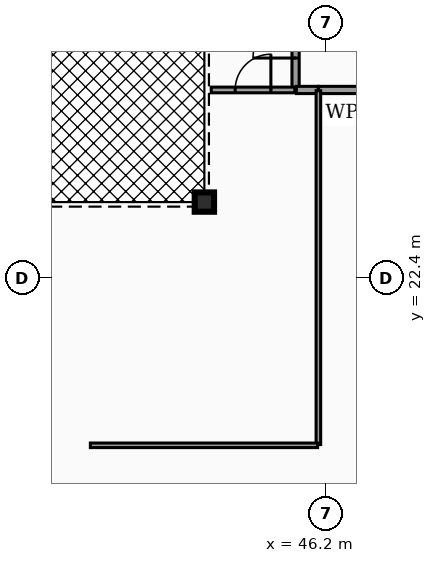
"""IFC4 building model, lengths in metres.
Left out: names, types, materials, properties, quantities, classifications, styles, units other than length and angle.
Written with IfcOpenShell. Run it as: python <this file> out.ifc"""

import sys

from ifc_helpers import new_model, si_unit, direction, frame, frame_2d, origin, origin_2d, place, context, subcontext, project, spatial, rectangle, hollow_circle, extrude, element, fill, save


model = new_model("IFC4")
c1 = context("Model", 3, precision=1e-05, world=origin(), true_north=direction((0.0, 1.0)))
c2 = subcontext(c1, "Body", "Model", "MODEL_VIEW")
j1 = project(units=[si_unit("LENGTHUNIT", "METRE"), si_unit("PLANEANGLEUNIT", "RADIAN")], contexts=[c1])
p1 = place(None, origin())
s1 = spatial("IfcSite", under=j1, at=p1, CompositionType="ELEMENT")
p2 = place(p1, origin())
s2 = spatial("IfcBuilding", under=s1, at=p2, CompositionType="ELEMENT")
p3 = place(p2, frame((0.0, 0.0, 9.52)))
s3 = spatial("IfcBuildingStorey", under=s2, at=p3, CompositionType="ELEMENT", Elevation=9.52)
p4 = place(p3, frame((43.0, 24.4, 0.0), z_axis=(0.0, 0.0, 1.0), x_axis=(1.0, 0.0, 0.0)))
e1 = element("IfcColumn", 1, at=p4, inside=s3, PredefinedType="COLUMN", context=c2, shape_type="SweptSolid", body=[
    extrude(hollow_circle(Radius=0.254, WallThickness=0.02, at=origin_2d()), origin(), (0.0, 0.0, 1.0), 4.14),
])
p5 = place(p3, frame((45.4, 27.37, 0.0), z_axis=(0.0, 0.0, 1.0), x_axis=(0.0, 1.0, 0.0)))
e2 = element("IfcWall", 2, at=p5, inside=s3, PredefinedType="PARTITIONING", context=c2, shape_type="SweptSolid", body=[
    extrude(rectangle(XDim=2.76, YDim=0.19, at=frame_2d((1.38, 0.0))), origin(), (0.0, 0.0, 1.0), 3.097),
])
p6 = place(p5, frame((0.82, 0.0, 0.0)))
e3 = element("IfcOpeningElement", 3, at=p6, cuts=e2, PredefinedType="OPENING", context=c2, shape_type="SweptSolid", body=[
    extrude(rectangle(XDim=1.12, YDim=2.05, at=frame_2d((0.56, 1.025))), frame((0.0, 0.105, 0.0), z_axis=(0.0, -1.0, 0.0), x_axis=(1.0, 0.0, 0.0)), (0.0, 0.0, 1.0), 0.21),
])
p7 = place(p3, frame((46.005, 27.35, 0.0), z_axis=(0.0, 0.0, 1.0), x_axis=(1.0, 0.0, 0.0)))
e4 = element("IfcWall", 4, at=p7, inside=s3, PredefinedType="PARTITIONING", context=c2, shape_type="SweptSolid", body=[
    extrude(rectangle(XDim=2.345, YDim=0.19, at=frame_2d((1.173, 0.0))), origin(), (0.0, 0.0, 1.0), 3.097),
])
p8 = place(p3, frame((45.42, 27.35, 0.0), z_axis=(0.0, 0.0, 1.0), x_axis=(1.0, 0.0, 0.0)))
e5 = element("IfcWall", 5, at=p8, inside=s3, PredefinedType="PARTITIONING", context=c2, shape_type="SweptSolid", body=[
    extrude(rectangle(XDim=0.575, YDim=0.19, at=frame_2d((0.288, 0.0))), origin(), (0.0, 0.0, 1.0), 3.097),
])
p9 = place(p3, frame((43.18, 27.35, 0.0), z_axis=(0.0, 0.0, 1.0), x_axis=(1.0, 0.0, 0.0)))
e6 = element("IfcWall", 6, at=p9, inside=s3, PredefinedType="PARTITIONING", context=c2, shape_type="SweptSolid", body=[
    extrude(rectangle(XDim=2.2, YDim=0.15, at=frame_2d((1.1, 0.0))), origin(), (0.0, 0.0, 1.0), 3.097),
])
p10 = place(p9, frame((0.63, 0.0, 0.0)))
e7 = element("IfcOpeningElement", 7, at=p10, cuts=e6, PredefinedType="OPENING", context=c2, shape_type="SweptSolid", body=[
    extrude(rectangle(XDim=0.94, YDim=2.05, at=frame_2d((0.47, 1.025))), frame((0.0, 0.085, 0.0), z_axis=(0.0, -1.0, 0.0), x_axis=(1.0, 0.0, 0.0)), (0.0, 0.0, 1.0), 0.17),
])
p11 = place(p3, frame((46.0, 18.02, 0.0), z_axis=(0.0, 0.0, 1.0), x_axis=(0.0, 1.0, 0.0)))
e8 = element("IfcWall", 8, at=p11, inside=s3, PredefinedType="PARTITIONING", context=c2, shape_type="SweptSolid", body=[
    extrude(rectangle(XDim=9.31, YDim=0.12, at=frame_2d((4.655, 0.0))), origin(), (0.0, 0.0, 1.0), 3.097),
])
p12 = place(p3, frame((40.0, 18.0, 0.0), z_axis=(0.0, 0.0, 1.0), x_axis=(1.0, 0.0, 0.0)))
e9 = element("IfcWall", 9, at=p12, inside=s3, PredefinedType="PARTITIONING", context=c2, shape_type="SweptSolid", body=[
    extrude(rectangle(XDim=5.98, YDim=0.12, at=frame_2d((2.99, 0.0))), origin(), (0.0, 0.0, 1.0), 3.097),
])
p13 = place(p6, origin())
e10 = element("IfcDoor", 10, at=p13, inside=s3, OperationType="SINGLE_SWING_LEFT", PredefinedType="DOOR", context=c2, shape_type="SweptSolid", body=[
    extrude(rectangle(XDim=1.12, YDim=2.05, at=frame_2d((0.56, 1.025))), frame((0.0, 0.025, 0.0), z_axis=(0.0, -1.0, 0.0), x_axis=(1.0, 0.0, 0.0)), (0.0, 0.0, 1.0), 0.05),
])
fill(e3, e10)
p14 = place(p10, origin())
e11 = element("IfcDoor", 11, at=p14, inside=s3, OperationType="SINGLE_SWING_RIGHT", PredefinedType="DOOR", context=c2, shape_type="SweptSolid", body=[
    extrude(rectangle(XDim=0.94, YDim=2.05, at=frame_2d((0.47, 1.025))), frame((0.0, 0.025, 0.0), z_axis=(0.0, -1.0, 0.0), x_axis=(1.0, 0.0, 0.0)), (0.0, 0.0, 1.0), 0.05),
])
fill(e7, e11)
save(model, sys.argv[1])
